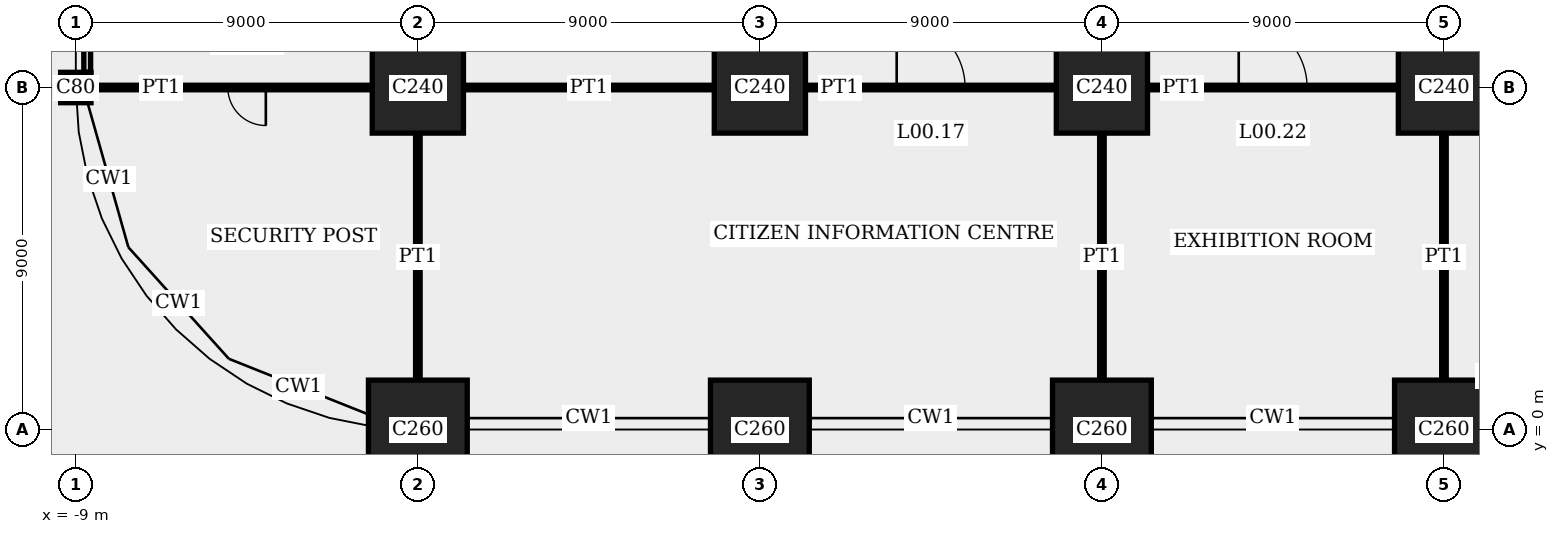
"""IFC4 building model, lengths in metres.
Left out: names, types, materials, properties, quantities, classifications, styles, units other than length and angle.
Written with IfcOpenShell. Run it as: python <this file> out.ifc"""

import sys

from ifc_helpers import new_model, si_unit, direction, frame, frame_2d, origin, origin_with_axes, origin_2d, place, context, subcontext, project, spatial, rectangle, extrude, element, fill, save


model = new_model("IFC4")
c1 = context("Model", 3, precision=1e-05, world=origin(), true_north=direction((0.0, 1.0)))
c2 = subcontext(c1, "Body", "Model", "MODEL_VIEW")
j1 = project(units=[si_unit("LENGTHUNIT", "METRE"), si_unit("PLANEANGLEUNIT", "RADIAN")], contexts=[c1])
p1 = place(None, origin())
s1 = spatial("IfcSite", under=j1, at=p1, CompositionType="ELEMENT")
p2 = place(p1, origin())
s2 = spatial("IfcBuilding", under=s1, at=p2, CompositionType="ELEMENT")
p3 = place(p2, origin())
s3 = spatial("IfcBuildingStorey", under=s2, at=p3, CompositionType="ELEMENT", Elevation=0.0)
p4 = place(p3, frame((-9.0, 9.0, 0.0), z_axis=(0.0, 0.0, 1.0), x_axis=(1.0, 0.0, 0.0)))
e1 = element("IfcColumn", 1, at=p4, inside=s3, PredefinedType="COLUMN", context=c2, shape_type="SweptSolid", body=[
    extrude(rectangle(XDim=0.8, YDim=0.8, at=origin_2d()), origin(), (0.0, 0.0, 1.0), 5.4),
])
p5 = place(p3, origin_with_axes())
e2 = element("IfcColumn", 2, at=p5, inside=s3, PredefinedType="COLUMN", context=c2, shape_type="SweptSolid", body=[
    extrude(rectangle(XDim=2.6, YDim=2.6, at=origin_2d()), origin(), (0.0, 0.0, 1.0), 5.4),
])
p6 = place(p3, frame((0.0, 9.0, 0.0), z_axis=(0.0, 0.0, 1.0), x_axis=(1.0, 0.0, 0.0)))
e3 = element("IfcColumn", 3, at=p6, inside=s3, PredefinedType="COLUMN", context=c2, shape_type="SweptSolid", body=[
    extrude(rectangle(XDim=2.4, YDim=2.4, at=origin_2d()), origin(), (0.0, 0.0, 1.0), 5.4),
])
p7 = place(p3, frame((9.0, 0.0, 0.0), z_axis=(0.0, 0.0, 1.0), x_axis=(1.0, 0.0, 0.0)))
e4 = element("IfcColumn", 4, at=p7, inside=s3, PredefinedType="COLUMN", context=c2, shape_type="SweptSolid", body=[
    extrude(rectangle(XDim=2.6, YDim=2.6, at=origin_2d()), origin(), (0.0, 0.0, 1.0), 5.4),
])
p8 = place(p3, frame((9.0, 9.0, 0.0), z_axis=(0.0, 0.0, 1.0), x_axis=(1.0, 0.0, 0.0)))
e5 = element("IfcColumn", 5, at=p8, inside=s3, PredefinedType="COLUMN", context=c2, shape_type="SweptSolid", body=[
    extrude(rectangle(XDim=2.4, YDim=2.4, at=origin_2d()), origin(), (0.0, 0.0, 1.0), 5.4),
])
p9 = place(p3, frame((18.0, 0.0, 0.0), z_axis=(0.0, 0.0, 1.0), x_axis=(1.0, 0.0, 0.0)))
e6 = element("IfcColumn", 6, at=p9, inside=s3, PredefinedType="COLUMN", context=c2, shape_type="SweptSolid", body=[
    extrude(rectangle(XDim=2.6, YDim=2.6, at=origin_2d()), origin(), (0.0, 0.0, 1.0), 5.4),
])
p10 = place(p3, frame((18.0, 9.0, 0.0), z_axis=(0.0, 0.0, 1.0), x_axis=(1.0, 0.0, 0.0)))
e7 = element("IfcColumn", 7, at=p10, inside=s3, PredefinedType="COLUMN", context=c2, shape_type="SweptSolid", body=[
    extrude(rectangle(XDim=2.4, YDim=2.4, at=origin_2d()), origin(), (0.0, 0.0, 1.0), 5.4),
])
p11 = place(p3, frame((27.0, 0.0, 0.0), z_axis=(0.0, 0.0, 1.0), x_axis=(1.0, 0.0, 0.0)))
e8 = element("IfcColumn", 8, at=p11, inside=s3, PredefinedType="COLUMN", context=c2, shape_type="SweptSolid", body=[
    extrude(rectangle(XDim=2.6, YDim=2.6, at=origin_2d()), origin(), (0.0, 0.0, 1.0), 5.4),
])
p12 = place(p3, frame((27.0, 9.0, 0.0), z_axis=(0.0, 0.0, 1.0), x_axis=(1.0, 0.0, 0.0)))
e9 = element("IfcColumn", 9, at=p12, inside=s3, PredefinedType="COLUMN", context=c2, shape_type="SweptSolid", body=[
    extrude(rectangle(XDim=2.4, YDim=2.4, at=origin_2d()), origin(), (0.0, 0.0, 1.0), 5.4),
])
p13 = place(p3, frame((-8.7, 9.4, 0.0), z_axis=(0.0, 0.0, 1.0), x_axis=(0.0, 1.0, 0.0)))
e10 = element("IfcWall", 10, at=p13, inside=s3, PredefinedType="SOLIDWALL", context=c2, shape_type="SweptSolid", body=[
    extrude(rectangle(XDim=8.2, YDim=0.18, at=frame_2d((4.1, 0.0))), origin(), (0.0, 0.0, 1.0), 4.3),
])
p14 = place(p13, frame((1.95, 0.0, 0.0)))
e11 = element("IfcOpeningElement", 11, at=p14, cuts=e10, PredefinedType="OPENING", context=c2, shape_type="SweptSolid", body=[
    extrude(rectangle(XDim=2.0, YDim=3.0, at=frame_2d((1.0, 1.5))), frame((0.0, 0.1, 0.0), z_axis=(0.0, -1.0, 0.0), x_axis=(1.0, 0.0, 0.0)), (0.0, 0.0, 1.0), 0.2),
])
p15 = place(p13, frame((4.25, 0.0, 0.0)))
e12 = element("IfcOpeningElement", 12, at=p15, cuts=e10, PredefinedType="OPENING", context=c2, shape_type="SweptSolid", body=[
    extrude(rectangle(XDim=2.0, YDim=3.0, at=frame_2d((1.0, 1.5))), frame((0.0, 0.1, 0.0), z_axis=(0.0, -1.0, 0.0), x_axis=(1.0, 0.0, 0.0)), (0.0, 0.0, 1.0), 0.2),
])
p16 = place(p3, frame((1.2, 9.0, 0.0), z_axis=(0.0, 0.0, 1.0), x_axis=(1.0, 0.0, 0.0)))
e13 = element("IfcWall", 13, at=p16, inside=s3, PredefinedType="PARTITIONING", context=c2, shape_type="SweptSolid", body=[
    extrude(rectangle(XDim=6.6, YDim=0.12, at=frame_2d((3.3, 0.0))), origin(), (0.0, 0.0, 1.0), 4.3),
])
p17 = place(p3, frame((10.2, 9.0, 0.0), z_axis=(0.0, 0.0, 1.0), x_axis=(1.0, 0.0, 0.0)))
e14 = element("IfcWall", 14, at=p17, inside=s3, PredefinedType="PARTITIONING", context=c2, shape_type="SweptSolid", body=[
    extrude(rectangle(XDim=6.6, YDim=0.12, at=frame_2d((3.3, 0.0))), origin(), (0.0, 0.0, 1.0), 4.3),
])
p18 = place(p17, frame((2.4, 0.0, 0.0)))
e15 = element("IfcOpeningElement", 15, at=p18, cuts=e14, PredefinedType="OPENING", context=c2, shape_type="SweptSolid", body=[
    extrude(rectangle(XDim=1.8, YDim=2.7, at=frame_2d((0.9, 1.35))), frame((0.0, 0.07, 0.0), z_axis=(0.0, -1.0, 0.0), x_axis=(1.0, 0.0, 0.0)), (0.0, 0.0, 1.0), 0.14),
])
for number, where, z_axis, x_axis in (
    (16, (0.0, 1.3, 0.0), (0.0, 0.0, 1.0), (0.0, 1.0, 0.0)),
    (17, (18.0, 1.3, 0.0), (0.0, 0.0, 1.0), (0.0, 1.0, 0.0)),
):
    element("IfcWall", number, at=place(p3, frame(where, z_axis=z_axis, x_axis=x_axis)), inside=s3, PredefinedType="PARTITIONING", context=c2, shape_type="SweptSolid", body=[
        extrude(rectangle(XDim=6.5, YDim=0.12, at=frame_2d((3.25, 0.0))), origin(), (0.0, 0.0, 1.0), 4.3),
    ])
p19 = place(p3, frame((-8.6, 9.0, 0.0), z_axis=(0.0, 0.0, 1.0), x_axis=(1.0, 0.0, 0.0)))
e18 = element("IfcWall", 18, at=p19, inside=s3, PredefinedType="PARTITIONING", context=c2, shape_type="SweptSolid", body=[
    extrude(rectangle(XDim=7.4, YDim=0.12, at=frame_2d((3.7, 0.0))), origin(), (0.0, 0.0, 1.0), 4.3),
])
p20 = place(p19, frame((3.6, 0.0, 0.0)))
e19 = element("IfcOpeningElement", 19, at=p20, cuts=e18, PredefinedType="OPENING", context=c2, shape_type="SweptSolid", body=[
    extrude(rectangle(XDim=1.0, YDim=2.4, at=frame_2d((0.5, 1.2))), frame((0.0, 0.07, 0.0), z_axis=(0.0, -1.0, 0.0), x_axis=(1.0, 0.0, 0.0)), (0.0, 0.0, 1.0), 0.14),
])
p21 = place(p3, frame((19.2, 9.0, 0.0), z_axis=(0.0, 0.0, 1.0), x_axis=(1.0, 0.0, 0.0)))
e20 = element("IfcWall", 20, at=p21, inside=s3, PredefinedType="PARTITIONING", context=c2, shape_type="SweptSolid", body=[
    extrude(rectangle(XDim=6.6, YDim=0.12, at=frame_2d((3.3, 0.0))), origin(), (0.0, 0.0, 1.0), 4.3),
])
p22 = place(p21, frame((2.4, 0.0, 0.0)))
e21 = element("IfcOpeningElement", 21, at=p22, cuts=e20, PredefinedType="OPENING", context=c2, shape_type="SweptSolid", body=[
    extrude(rectangle(XDim=1.8, YDim=2.7, at=frame_2d((0.9, 1.35))), frame((0.0, 0.07, 0.0), z_axis=(0.0, -1.0, 0.0), x_axis=(1.0, 0.0, 0.0)), (0.0, 0.0, 1.0), 0.14),
])
p23 = place(p3, frame((27.0, 1.3, 0.0), z_axis=(0.0, 0.0, 1.0), x_axis=(0.0, 1.0, 0.0)))
e22 = element("IfcWall", 22, at=p23, inside=s3, PredefinedType="PARTITIONING", context=c2, shape_type="SweptSolid", body=[
    extrude(rectangle(XDim=6.5, YDim=0.12, at=frame_2d((3.25, 0.0))), origin(), (0.0, 0.0, 1.0), 4.3),
])
p24 = place(p18, origin())
e23 = element("IfcDoor", 23, at=p24, inside=s3, OperationType="DOUBLE_DOOR_DOUBLE_SWING", PredefinedType="DOOR", context=c2, shape_type="SweptSolid", body=[
    extrude(rectangle(XDim=1.8, YDim=2.7, at=frame_2d((0.9, 1.35))), frame((0.0, 0.025, 0.0), z_axis=(0.0, -1.0, 0.0), x_axis=(1.0, 0.0, 0.0)), (0.0, 0.0, 1.0), 0.05),
])
fill(e15, e23)
p25 = place(p20, origin())
e24 = element("IfcDoor", 24, at=p25, inside=s3, OperationType="SINGLE_SWING_RIGHT", PredefinedType="DOOR", context=c2, shape_type="SweptSolid", body=[
    extrude(rectangle(XDim=1.0, YDim=2.4, at=frame_2d((0.5, 1.2))), frame((0.0, 0.025, 0.0), z_axis=(0.0, -1.0, 0.0), x_axis=(1.0, 0.0, 0.0)), (0.0, 0.0, 1.0), 0.05),
])
fill(e19, e24)
p26 = place(p22, origin())
e25 = element("IfcDoor", 25, at=p26, inside=s3, OperationType="DOUBLE_DOOR_DOUBLE_SWING", PredefinedType="DOOR", context=c2, shape_type="SweptSolid", body=[
    extrude(rectangle(XDim=1.8, YDim=2.7, at=frame_2d((0.9, 1.35))), frame((0.0, 0.025, 0.0), z_axis=(0.0, -1.0, 0.0), x_axis=(1.0, 0.0, 0.0)), (0.0, 0.0, 1.0), 0.05),
])
fill(e21, e25)
save(model, sys.argv[1])
